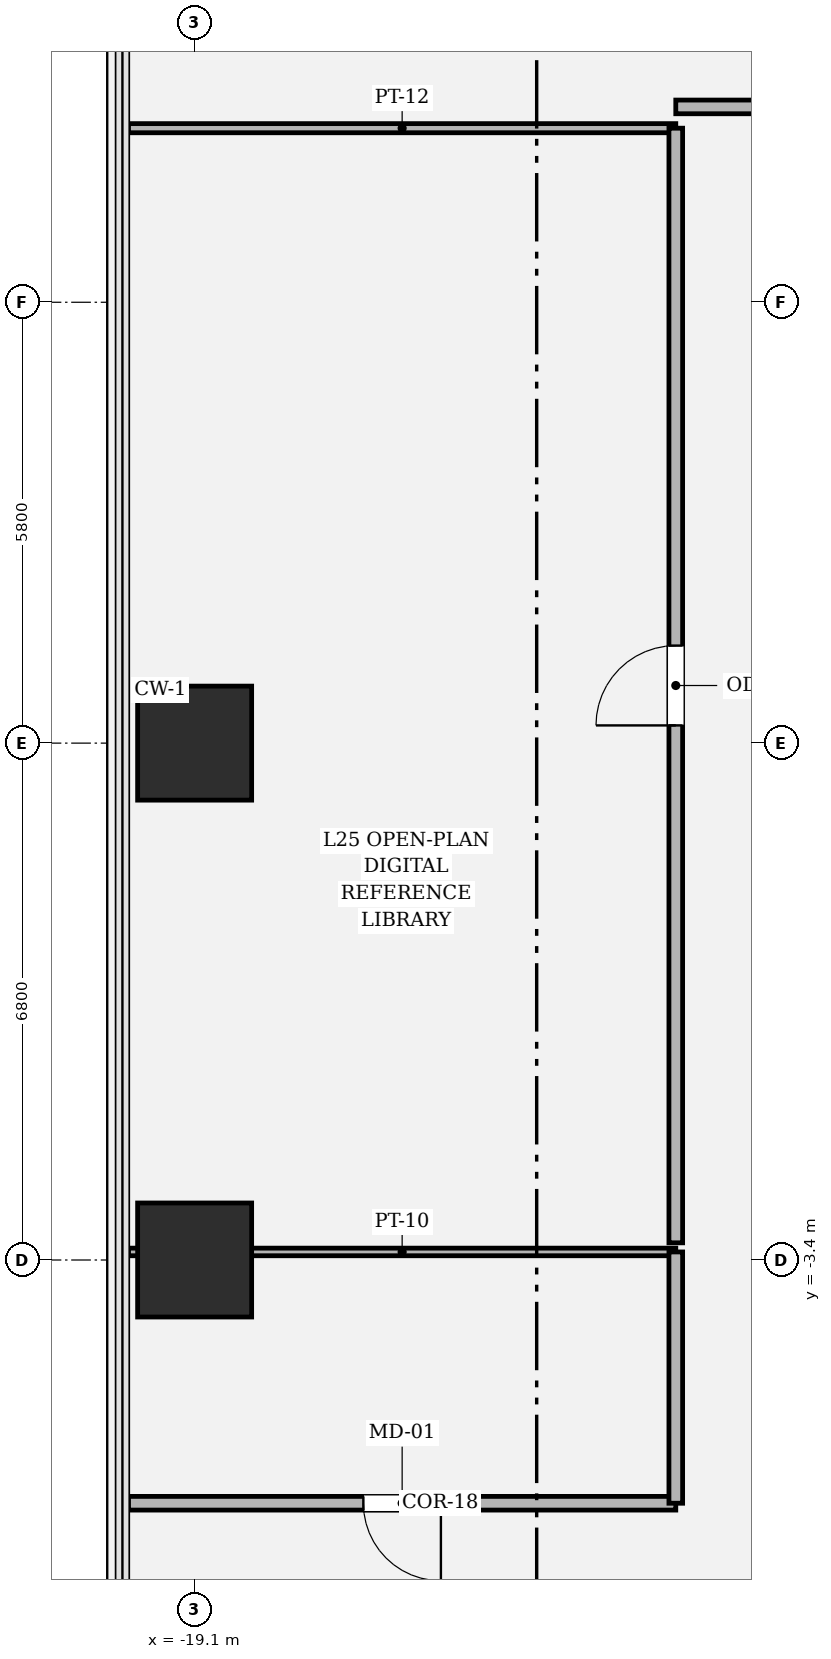
"""IFC4 building model, lengths in metres.
Left out: names, types, materials, properties, quantities, classifications, styles, units other than length and angle.
Written with IfcOpenShell. Run it as: python <this file> out.ifc"""

import sys

from ifc_helpers import new_model, si_unit, direction, frame, frame_2d, origin, origin_2d, place, context, subcontext, project, spatial, rectangle, hollow_rectangle, extrude, element, fill, save


model = new_model("IFC4")
c1 = context("Model", 3, precision=1e-05, world=origin(), true_north=direction((0.0, 1.0)))
c2 = subcontext(c1, "Body", "Model", "MODEL_VIEW")
j1 = project(units=[si_unit("LENGTHUNIT", "METRE"), si_unit("PLANEANGLEUNIT", "RADIAN")], contexts=[c1])
p1 = place(None, origin())
s1 = spatial("IfcSite", under=j1, at=p1, CompositionType="ELEMENT")
p2 = place(p1, origin())
s2 = spatial("IfcBuilding", under=s1, at=p2, CompositionType="ELEMENT")
p3 = place(p2, frame((0.0, 0.0, 109.2)))
s3 = spatial("IfcBuildingStorey", under=s2, at=p3, CompositionType="ELEMENT", Elevation=109.2)
for number, where, z_axis, x_axis in (
    (1, (-19.1, 3.4, 0.0), (0.0, 0.0, 1.0), (1.0, 0.0, 0.0)),
    (2, (-19.1, -3.4, 0.0), (0.0, 0.0, 1.0), (1.0, 0.0, 0.0)),
):
    element("IfcColumn", number, at=place(p3, frame(where, z_axis=z_axis, x_axis=x_axis)), inside=s3, PredefinedType="COLUMN", context=c2, shape_type="SweptSolid", body=[
        extrude(hollow_rectangle(XDim=1.5, YDim=1.5, WallThickness=0.045, at=origin_2d()), origin(), (0.0, 0.0, 1.0), 4.05),
    ])
p4 = place(p3, frame((-12.77, -6.6, 0.0), z_axis=(0.0, 0.0, 1.0), x_axis=(-1.0, 0.0, 0.0)))
e3 = element("IfcWall", 3, at=p4, inside=s3, PredefinedType="PARTITIONING", context=c2, shape_type="SweptSolid", body=[
    extrude(rectangle(XDim=7.2, YDim=0.18, at=frame_2d((3.6, 0.0))), origin(), (0.0, 0.0, 1.0), 3.104),
])
p5 = place(p4, frame((3.09, 0.0, 0.0)))
e4 = element("IfcOpeningElement", 4, at=p5, cuts=e3, PredefinedType="OPENING", context=c2, shape_type="SweptSolid", body=[
    extrude(rectangle(XDim=1.02, YDim=2.2, at=frame_2d((0.51, 1.1))), frame((0.0, 0.1, 0.0), z_axis=(0.0, -1.0, 0.0), x_axis=(1.0, 0.0, 0.0)), (0.0, 0.0, 1.0), 0.2),
])
p6 = place(p3, frame((-19.97, -3.294, 0.0), z_axis=(0.0, 0.0, 1.0), x_axis=(1.0, 0.0, 0.0)))
e5 = element("IfcWall", 5, at=p6, inside=s3, PredefinedType="PARTITIONING", context=c2, shape_type="SweptSolid", body=[
    extrude(rectangle(XDim=7.2, YDim=0.1, at=frame_2d((3.6, 0.0))), origin(), (0.0, 0.0, 1.0), 3.104),
])
p7 = place(p3, frame((-12.77, -3.294, 0.0), z_axis=(0.0, 0.0, 1.0), x_axis=(0.0, -1.0, 0.0)))
e6 = element("IfcWall", 6, at=p7, inside=s3, PredefinedType="PARTITIONING", context=c2, shape_type="SweptSolid", body=[
    extrude(rectangle(XDim=3.306, YDim=0.18, at=frame_2d((1.653, 0.0))), origin(), (0.0, 0.0, 1.0), 3.104),
])
p8 = place(p3, frame((-19.97, 11.49, 0.0), z_axis=(0.0, 0.0, 1.0), x_axis=(1.0, 0.0, 0.0)))
e7 = element("IfcWall", 7, at=p8, inside=s3, PredefinedType="PARTITIONING", context=c2, shape_type="SweptSolid", body=[
    extrude(rectangle(XDim=7.2, YDim=0.12, at=frame_2d((3.6, 0.0))), origin(), (0.0, 0.0, 1.0), 3.104),
])
p9 = place(p3, frame((-12.77, 11.49, 0.0), z_axis=(0.0, 0.0, 1.0), x_axis=(0.0, -1.0, 0.0)))
e8 = element("IfcWall", 8, at=p9, inside=s3, PredefinedType="PARTITIONING", context=c2, shape_type="SweptSolid", body=[
    extrude(rectangle(XDim=14.664, YDim=0.18, at=frame_2d((7.332, 0.0))), origin(), (0.0, 0.0, 1.0), 3.104),
])
p10 = place(p9, frame((6.807, 0.0, 0.0)))
e9 = element("IfcOpeningElement", 9, at=p10, cuts=e8, PredefinedType="OPENING", context=c2, shape_type="SweptSolid", body=[
    extrude(rectangle(XDim=1.05, YDim=2.2, at=frame_2d((0.525, 1.1))), frame((0.0, 0.1, 0.0), z_axis=(0.0, -1.0, 0.0), x_axis=(1.0, 0.0, 0.0)), (0.0, 0.0, 1.0), 0.2),
])
p11 = place(p3, frame((-7.846, 11.77, 0.0), z_axis=(0.0, 0.0, 1.0), x_axis=(-1.0, 0.0, 0.0)))
e10 = element("IfcWall", 10, at=p11, inside=s3, PredefinedType="PARTITIONING", context=c2, shape_type="SweptSolid", body=[
    extrude(rectangle(XDim=4.924, YDim=0.18, at=frame_2d((2.462, 0.0))), origin(), (0.0, 0.0, 1.0), 3.104),
])
p12 = place(p11, frame((1.937, 0.0, 0.0)))
e11 = element("IfcOpeningElement", 11, at=p12, cuts=e10, PredefinedType="OPENING", context=c2, shape_type="SweptSolid", body=[
    extrude(rectangle(XDim=1.05, YDim=2.2, at=frame_2d((0.525, 1.1))), frame((0.0, 0.1, 0.0), z_axis=(0.0, -1.0, 0.0), x_axis=(1.0, 0.0, 0.0)), (0.0, 0.0, 1.0), 0.2),
])
p13 = place(p5, origin())
e12 = element("IfcDoor", 12, at=p13, inside=s3, OperationType="SINGLE_SWING_LEFT", PredefinedType="DOOR", context=c2, shape_type="SweptSolid", body=[
    extrude(rectangle(XDim=1.02, YDim=2.2, at=frame_2d((0.51, 1.1))), frame((0.0, 0.025, 0.0), z_axis=(0.0, -1.0, 0.0), x_axis=(1.0, 0.0, 0.0)), (0.0, 0.0, 1.0), 0.05),
])
fill(e4, e12)
p14 = place(p10, origin())
e13 = element("IfcDoor", 13, at=p14, inside=s3, OperationType="SINGLE_SWING_RIGHT", PredefinedType="DOOR", context=c2, shape_type="SweptSolid", body=[
    extrude(rectangle(XDim=1.05, YDim=2.2, at=frame_2d((0.525, 1.1))), frame((0.0, 0.025, 0.0), z_axis=(0.0, -1.0, 0.0), x_axis=(1.0, 0.0, 0.0)), (0.0, 0.0, 1.0), 0.05),
])
fill(e9, e13)
save(model, sys.argv[1])
